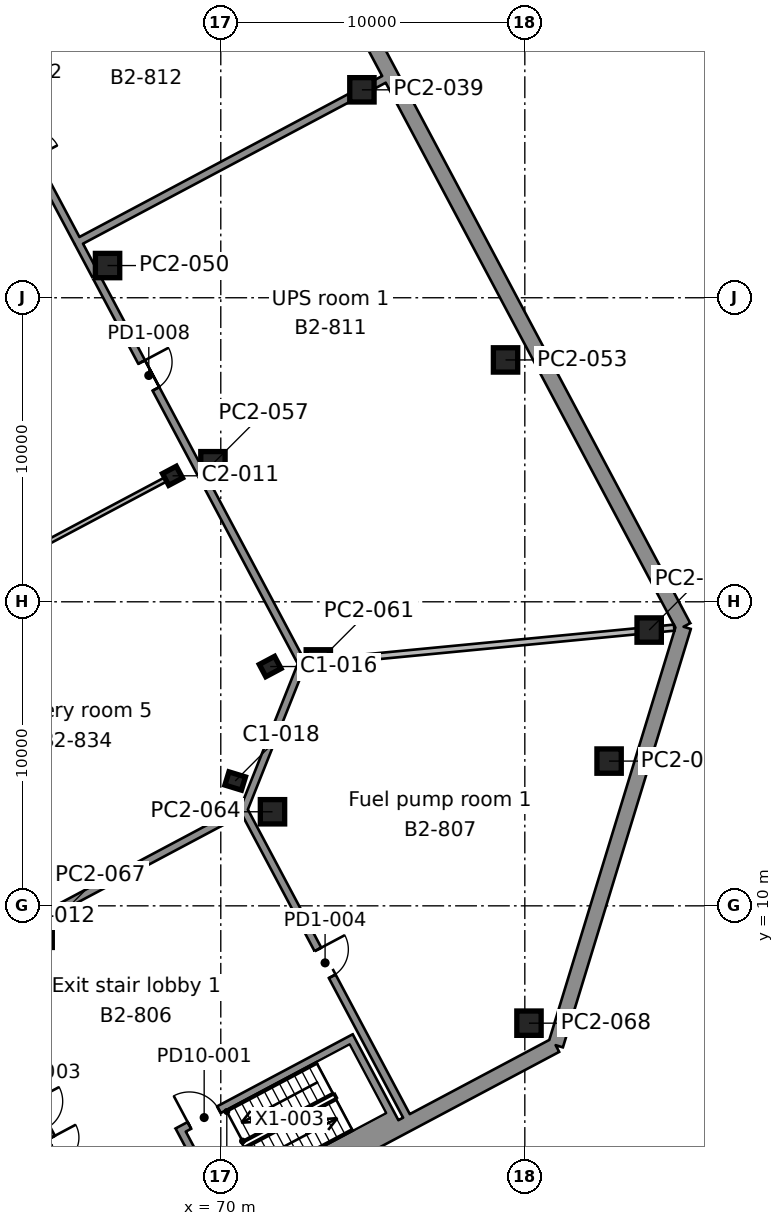
"""IFC4 building model, lengths in metres.
Left out: names, types, materials, properties, quantities, classifications, styles, units other than length and angle.
Written with IfcOpenShell. Run it as: python <this file> out.ifc"""

import sys

from ifc_helpers import new_model, si_unit, direction, frame, frame_2d, origin, origin_2d, place, context, subcontext, project, spatial, rectangle, i_section, extrude, element, fill, save


model = new_model("IFC4")
c1 = context("Model", 3, precision=1e-05, world=origin(), true_north=direction((0.0, 1.0)))
c2 = subcontext(c1, "Body", "Model", "MODEL_VIEW")
j1 = project(units=[si_unit("LENGTHUNIT", "METRE"), si_unit("PLANEANGLEUNIT", "RADIAN")], contexts=[c1])
p1 = place(None, origin())
s1 = spatial("IfcSite", under=j1, at=p1, CompositionType="ELEMENT")
p2 = place(p1, origin())
s2 = spatial("IfcBuilding", under=s1, at=p2, CompositionType="ELEMENT")
p3 = place(p2, frame((0.0, 0.0, -9.0)))
s3 = spatial("IfcBuildingStorey", under=s2, at=p3, CompositionType="ELEMENT", Elevation=-9.0)
for number, where, z_axis, x_axis in (
    (1, (70.474, 14.106, 0.0), (0.0, 0.0, 1.0), (0.292, 0.956, 0.0)),
    (2, (71.625, 17.871, 0.0), (0.0, 0.0, 1.0), (-0.469, 0.883, 0.0)),
):
    element("IfcColumn", number, at=place(p3, frame(where, z_axis=z_axis, x_axis=x_axis)), inside=s3, PredefinedType="COLUMN", context=c2, shape_type="SweptSolid", body=[
        extrude(i_section(OverallWidth=0.455, OverallDepth=0.569, WebThickness=0.078, FlangeThickness=0.125, FilletRadius=0.015, at=origin_2d()), origin(), (0.0, 0.0, 1.0), 4.5),
    ])
p4 = place(p3, frame((68.413, 24.144, 0.0), z_axis=(0.0, 0.0, 1.0), x_axis=(-0.469471562786, 0.882947592859, 0.0)))
e3 = element("IfcColumn", 3, at=p4, inside=s3, PredefinedType="COLUMN", context=c2, shape_type="SweptSolid", body=[
    extrude(i_section(OverallWidth=0.437, OverallDepth=0.513, WebThickness=0.061, FlangeThickness=0.097, FilletRadius=0.015, at=origin_2d()), origin(), (0.0, 0.0, 1.0), 4.5),
])
p5 = place(p3, frame((5.703, -34.625, 0.0), z_axis=(0.0, 0.0, 1.0), x_axis=(0.882947521781, 0.469471696464, 0.0)))
e4 = element("IfcWall", 4, at=p5, inside=s3, PredefinedType="SOLIDWALL", context=c2, shape_type="SweptSolid", body=[
    extrude(rectangle(XDim=85.294, YDim=0.5, at=frame_2d((42.647, 0.0))), origin(), (0.0, 0.0, 1.0), 4.5),
])
p6 = place(p3, frame((81.013, 5.418, 0.0), z_axis=(0.0, 0.0, 1.0), x_axis=(0.292375850554, 0.956303488445, 0.0)))
e5 = element("IfcWall", 5, at=p6, inside=s3, PredefinedType="SOLIDWALL", context=c2, shape_type="SweptSolid", body=[
    extrude(rectangle(XDim=14.391, YDim=0.5, at=frame_2d((7.195, 0.0))), origin(), (0.0, 0.0, 1.0), 4.5),
])
p7 = place(p3, frame((85.221, 19.18, 0.0), z_axis=(0.0, 0.0, 1.0), x_axis=(-0.469470569953, 0.882948120757, 0.0)))
e6 = element("IfcWall", 6, at=p7, inside=s3, PredefinedType="SOLIDWALL", context=c2, shape_type="SweptSolid", body=[
    extrude(rectangle(XDim=46.148, YDim=0.5, at=frame_2d((23.074, 0.0))), origin(), (0.0, 0.0, 1.0), 4.5),
])
for number, where, z_axis, x_axis in (
    (7, (80.137, 6.141, 0.0), (0.0, 0.0, 1.0), (1.0, 0.0, 0.0)),
    (8, (71.701, 13.094, 0.0), (0.0, 0.0, 1.0), (1.0, 0.0, 0.0)),
    (9, (82.772, 14.761, 0.0), (0.0, 0.0, 1.0), (1.0, 0.0, 0.0)),
    (10, (73.208, 18.023, 0.0), (0.0, 0.0, 1.0), (1.0, 0.0, 0.0)),
    (11, (84.09, 19.071, 0.0), (0.0, 0.0, 1.0), (1.0, 0.0, 0.0)),
    (12, (69.742, 24.541, 0.0), (0.0, 0.0, 1.0), (1.0, 0.0, 0.0)),
    (13, (79.366, 27.955, 0.0), (0.0, 0.0, 1.0), (1.0, 0.0, 0.0)),
    (14, (66.276, 31.059, 0.0), (0.0, 0.0, 1.0), (1.0, 0.0, 0.0)),
    (15, (74.642, 36.839, 0.0), (0.0, 0.0, 1.0), (1.0, 0.0, 0.0)),
):
    element("IfcColumn", number, at=place(p3, frame(where, z_axis=z_axis, x_axis=x_axis)), inside=s3, PredefinedType="COLUMN", context=c2, shape_type="SweptSolid", body=[
        extrude(rectangle(XDim=0.8, YDim=0.8, at=origin_2d()), origin(), (0.0, 0.0, 1.0), 4.1),
    ])
p8 = place(p3, frame((66.711, -1.904, 0.0), z_axis=(0.0, 0.0, 1.0), x_axis=(-0.469474097874, 0.882946244924, 0.0)))
e16 = element("IfcWall", 16, at=p8, inside=s3, PredefinedType="SOLIDWALL", context=c2, shape_type="SweptSolid", body=[
    extrude(rectangle(XDim=11.4, YDim=0.25, at=frame_2d((5.7, 0.0))), origin(), (0.0, 0.0, 1.0), 4.1),
])
p9 = place(p8, frame((5.2, 0.0, 0.0)))
e17 = element("IfcOpeningElement", 17, at=p9, cuts=e16, PredefinedType="OPENING", context=c2, shape_type="SweptSolid", body=[
    extrude(rectangle(XDim=1.0, YDim=2.1, at=frame_2d((0.5, 1.05))), frame((0.0, 0.135, 0.0), z_axis=(0.0, -1.0, 0.0), x_axis=(1.0, 0.0, 0.0)), (0.0, 0.0, 1.0), 0.27),
])
p10 = place(p8, frame((3.05, 0.0, 0.0)))
e18 = element("IfcOpeningElement", 18, at=p10, cuts=e16, PredefinedType="OPENING", context=c2, shape_type="SweptSolid", body=[
    extrude(rectangle(XDim=1.8, YDim=2.1, at=frame_2d((0.9, 1.05))), frame((0.0, 0.135, 0.0), z_axis=(0.0, -1.0, 0.0), x_axis=(1.0, 0.0, 0.0)), (0.0, 0.0, 1.0), 0.27),
])
p11 = place(p3, frame((76.107, 3.092, 0.0), z_axis=(0.0, 0.0, 1.0), x_axis=(-0.469474097874, 0.882946244924, 0.0)))
e19 = element("IfcWall", 19, at=p11, inside=s3, PredefinedType="SOLIDWALL", context=c2, shape_type="SweptSolid", body=[
    extrude(rectangle(XDim=11.4, YDim=0.25, at=frame_2d((5.7, 0.0))), origin(), (0.0, 0.0, 1.0), 4.1),
])
p12 = place(p11, frame((5.2, 0.0, 0.0)))
e20 = element("IfcOpeningElement", 20, at=p12, cuts=e19, PredefinedType="OPENING", context=c2, shape_type="SweptSolid", body=[
    extrude(rectangle(XDim=1.0, YDim=2.1, at=frame_2d((0.5, 1.05))), frame((0.0, 0.135, 0.0), z_axis=(0.0, -1.0, 0.0), x_axis=(1.0, 0.0, 0.0)), (0.0, 0.0, 1.0), 0.27),
])
p13 = place(p3, frame((70.758, 13.159, 0.0), z_axis=(0.0, 0.0, 1.0), x_axis=(-0.882950480299, -0.46946613226, 0.0)))
e21 = element("IfcWall", 21, at=p13, inside=s3, PredefinedType="SOLIDWALL", context=c2, shape_type="SweptSolid", body=[
    extrude(rectangle(XDim=7.941, YDim=0.25, at=frame_2d((3.971, 0.0))), origin(), (0.0, 0.0, 1.0), 4.1),
])
p14 = place(p3, frame((84.912, 19.15, 0.0), z_axis=(0.0, 0.0, 1.0), x_axis=(-0.995412196651, -0.095679458393, 0.0)))
e22 = element("IfcWall", 22, at=p14, inside=s3, PredefinedType="PARTITIONING", context=c2, shape_type="SweptSolid", body=[
    extrude(rectangle(XDim=0.424, YDim=0.2, at=frame_2d((0.212, 0.0))), origin(), (0.0, 0.0, 1.0), 4.1),
])
p15 = place(p3, frame((83.69, 19.032, 0.0), z_axis=(0.0, 0.0, 1.0), x_axis=(-0.995397009029, -0.095837333105, 0.0)))
e23 = element("IfcWall", 23, at=p15, inside=s3, PredefinedType="PARTITIONING", context=c2, shape_type="SweptSolid", body=[
    extrude(rectangle(XDim=10.129, YDim=0.2, at=frame_2d((5.064, 0.0))), origin(), (0.0, 0.0, 1.0), 4.1),
])
p16 = place(p3, frame((72.669, 17.971, 0.0), z_axis=(0.0, 0.0, 1.0), x_axis=(-0.370009777786, -0.929027859831, 0.0)))
e24 = element("IfcWall", 24, at=p16, inside=s3, PredefinedType="SOLIDWALL", context=c2, shape_type="SweptSolid", body=[
    extrude(rectangle(XDim=5.184, YDim=0.25, at=frame_2d((2.592, 0.0))), origin(), (0.0, 0.0, 1.0), 4.1),
])
p17 = place(p3, frame((75.366, 37.182, 0.0), z_axis=(0.0, 0.0, 1.0), x_axis=(-0.882960484464, -0.4694473164, 0.0)))
e25 = element("IfcWall", 25, at=p17, inside=s3, PredefinedType="SOLIDWALL", context=c2, shape_type="SweptSolid", body=[
    extrude(rectangle(XDim=0.367, YDim=0.25, at=frame_2d((0.183, 0.0))), origin(), (0.0, 0.0, 1.0), 4.1),
])
p18 = place(p3, frame((74.242, 36.585, 0.0), z_axis=(0.0, 0.0, 1.0), x_axis=(-0.882936179938, -0.469493026738, 0.0)))
e26 = element("IfcWall", 26, at=p18, inside=s3, PredefinedType="SOLIDWALL", context=c2, shape_type="SweptSolid", body=[
    extrude(rectangle(XDim=10.127, YDim=0.25, at=frame_2d((5.063, 0.0))), origin(), (0.0, 0.0, 1.0), 4.1),
])
p19 = place(p3, frame((65.303, 31.825, 0.0), z_axis=(0.0, 0.0, 1.0), x_axis=(0.46947695358, -0.882944726502, 0.0)))
e27 = element("IfcWall", 27, at=p19, inside=s3, PredefinedType="SOLIDWALL", context=c2, shape_type="SweptSolid", body=[
    extrude(rectangle(XDim=1.22, YDim=0.25, at=frame_2d((0.61, 0.0))), origin(), (0.0, 0.0, 1.0), 4.1),
])
p20 = place(p3, frame((65.923, 30.659, 0.0), z_axis=(0.0, 0.0, 1.0), x_axis=(0.469479540895, -0.882943350777, 0.0)))
e28 = element("IfcWall", 28, at=p20, inside=s3, PredefinedType="SOLIDWALL", context=c2, shape_type="SweptSolid", body=[
    extrude(rectangle(XDim=7.283, YDim=0.25, at=frame_2d((3.642, 0.0))), origin(), (0.0, 0.0, 1.0), 4.1),
])
p21 = place(p20, frame((3.141, 0.0, 0.0)))
e29 = element("IfcOpeningElement", 29, at=p21, cuts=e28, PredefinedType="OPENING", context=c2, shape_type="SweptSolid", body=[
    extrude(rectangle(XDim=1.0, YDim=2.1, at=frame_2d((0.5, 1.05))), frame((0.0, 0.135, 0.0), z_axis=(0.0, -1.0, 0.0), x_axis=(1.0, 0.0, 0.0)), (0.0, 0.0, 1.0), 0.27),
])
p22 = place(p3, frame((69.389, 24.141, 0.0), z_axis=(0.0, 0.0, 1.0), x_axis=(0.469461736628, -0.882952817449, 0.0)))
e30 = element("IfcWall", 30, at=p22, inside=s3, PredefinedType="SOLIDWALL", context=c2, shape_type="SweptSolid", body=[
    extrude(rectangle(XDim=6.988, YDim=0.25, at=frame_2d((3.494, 0.0))), origin(), (0.0, 0.0, 1.0), 4.1),
])
p23 = place(p3, frame((62.457, 37.177, 0.0), z_axis=(0.0, 0.0, 1.0), x_axis=(0.469458615732, -0.882954476808, 0.0)))
e31 = element("IfcWall", 31, at=p23, inside=s3, PredefinedType="SOLIDWALL", context=c2, shape_type="SweptSolid", body=[
    extrude(rectangle(XDim=6.06, YDim=0.25, at=frame_2d((3.03, 0.0))), origin(), (0.0, 0.0, 1.0), 4.1),
])
p24 = place(p23, frame((1.13, 0.0, 0.0)))
e32 = element("IfcOpeningElement", 32, at=p24, cuts=e31, PredefinedType="OPENING", context=c2, shape_type="SweptSolid", body=[
    extrude(rectangle(XDim=1.8, YDim=2.1, at=frame_2d((0.9, 1.05))), frame((0.0, 0.135, 0.0), z_axis=(0.0, -1.0, 0.0), x_axis=(1.0, 0.0, 0.0)), (0.0, 0.0, 1.0), 0.27),
])
p25 = place(p3, frame((57.957, 18.584, 0.0), z_axis=(0.0, 0.0, 1.0), x_axis=(0.882944872937, 0.469476678179, 0.0)))
e33 = element("IfcWall", 33, at=p25, inside=s3, PredefinedType="PARTITIONING", context=c2, shape_type="SweptSolid", body=[
    extrude(rectangle(XDim=11.586, YDim=0.15, at=frame_2d((5.793, 0.0))), origin(), (0.0, 0.0, 1.0), 4.1),
])
p26 = place(p25, frame((5.273, 0.0, 0.0)))
e34 = element("IfcOpeningElement", 34, at=p26, cuts=e33, PredefinedType="OPENING", context=c2, shape_type="SweptSolid", body=[
    extrude(rectangle(XDim=1.0, YDim=2.1, at=frame_2d((0.5, 1.05))), frame((0.0, 0.085, 0.0), z_axis=(0.0, -1.0, 0.0), x_axis=(1.0, 0.0, 0.0)), (0.0, 0.0, 1.0), 0.17),
])
p27 = place(p3, frame((69.937, 0.264, 0.0), z_axis=(0.0, 0.0, 1.0), x_axis=(-0.469533439143, 0.882914689835, 0.0)))
e35 = element("IfcWall", 35, at=p27, inside=s3, PredefinedType="SOLIDWALL", context=c2, shape_type="SweptSolid", body=[
    extrude(rectangle(XDim=2.8, YDim=0.25, at=frame_2d((1.4, 0.0))), origin(), (0.0, 0.0, 1.0), 4.1),
])
p28 = place(p3, frame((75.544, 3.245, 0.0), z_axis=(0.0, 0.0, 1.0), x_axis=(-0.469497295046, 0.882933910293, 0.0)))
e36 = element("IfcWall", 36, at=p28, inside=s3, PredefinedType="SOLIDWALL", context=c2, shape_type="SweptSolid", body=[
    extrude(rectangle(XDim=2.8, YDim=0.25, at=frame_2d((1.4, 0.0))), origin(), (0.0, 0.0, 1.0), 4.1),
])
p29 = place(p3, frame((68.571, 2.567, 0.0), z_axis=(0.0, 0.0, 1.0), x_axis=(0.882937969766, 0.469489660743, 0.0)))
e37 = element("IfcWall", 37, at=p29, inside=s3, PredefinedType="SOLIDWALL", context=c2, shape_type="SweptSolid", body=[
    extrude(rectangle(XDim=6.6, YDim=0.25, at=frame_2d((3.3, 0.0))), origin(), (0.0, 0.0, 1.0), 4.1),
])
p30 = place(p29, frame((0.45, 0.0, 0.0)))
e38 = element("IfcOpeningElement", 38, at=p30, cuts=e37, PredefinedType="OPENING", context=c2, shape_type="SweptSolid", body=[
    extrude(rectangle(XDim=1.1, YDim=2.1, at=frame_2d((0.55, 1.05))), frame((0.0, 0.135, 0.0), z_axis=(0.0, -1.0, 0.0), x_axis=(1.0, 0.0, 0.0)), (0.0, 0.0, 1.0), 0.27),
])
p31 = place(p3, frame((69.92, 0.029, 0.0), z_axis=(0.0, 0.0, 1.0), x_axis=(0.882953303447, 0.469460822575, 0.0)))
e39 = element("IfcWall", 39, at=p31, inside=s3, PredefinedType="SOLIDWALL", context=c2, shape_type="SweptSolid", body=[
    extrude(rectangle(XDim=6.6, YDim=0.4, at=frame_2d((3.3, 0.0))), origin(), (0.0, 0.0, 1.0), 4.1),
])
p32 = place(p30, origin())
e40 = element("IfcDoor", 40, at=p32, inside=s3, OperationType="SINGLE_SWING_LEFT", PredefinedType="DOOR", context=c2, shape_type="SweptSolid", body=[
    extrude(rectangle(XDim=1.1, YDim=2.1, at=frame_2d((0.55, 1.05))), frame((0.0, 0.025, 0.0), z_axis=(0.0, -1.0, 0.0), x_axis=(1.0, 0.0, 0.0)), (0.0, 0.0, 1.0), 0.05),
])
fill(e38, e40)
p33 = place(p21, origin())
e41 = element("IfcDoor", 41, at=p33, inside=s3, OperationType="SINGLE_SWING_LEFT", PredefinedType="DOOR", context=c2, shape_type="SweptSolid", body=[
    extrude(rectangle(XDim=1.0, YDim=2.1, at=frame_2d((0.5, 1.05))), frame((0.0, 0.025, 0.0), z_axis=(0.0, -1.0, 0.0), x_axis=(1.0, 0.0, 0.0)), (0.0, 0.0, 1.0), 0.05),
])
fill(e29, e41)
p34 = place(p12, frame((1.0, 0.0, 0.0), z_axis=(0.0, 0.0, 1.0), x_axis=(-1.0, 0.0, 0.0)))
e42 = element("IfcDoor", 42, at=p34, inside=s3, OperationType="SINGLE_SWING_LEFT", PredefinedType="DOOR", context=c2, shape_type="SweptSolid", body=[
    extrude(rectangle(XDim=1.0, YDim=2.1, at=frame_2d((0.5, 1.05))), frame((0.0, 0.025, 0.0), z_axis=(0.0, -1.0, 0.0), x_axis=(1.0, 0.0, 0.0)), (0.0, 0.0, 1.0), 0.05),
])
fill(e20, e42)
p35 = place(p10, frame((1.8, 0.0, 0.0), z_axis=(0.0, 0.0, 1.0), x_axis=(-1.0, 0.0, 0.0)))
e43 = element("IfcDoor", 43, at=p35, inside=s3, OperationType="DOUBLE_DOOR_SINGLE_SWING", PredefinedType="DOOR", context=c2, shape_type="SweptSolid", body=[
    extrude(rectangle(XDim=1.8, YDim=2.1, at=frame_2d((0.9, 1.05))), frame((0.0, 0.025, 0.0), z_axis=(0.0, -1.0, 0.0), x_axis=(1.0, 0.0, 0.0)), (0.0, 0.0, 1.0), 0.05),
])
fill(e18, e43)
save(model, sys.argv[1])
